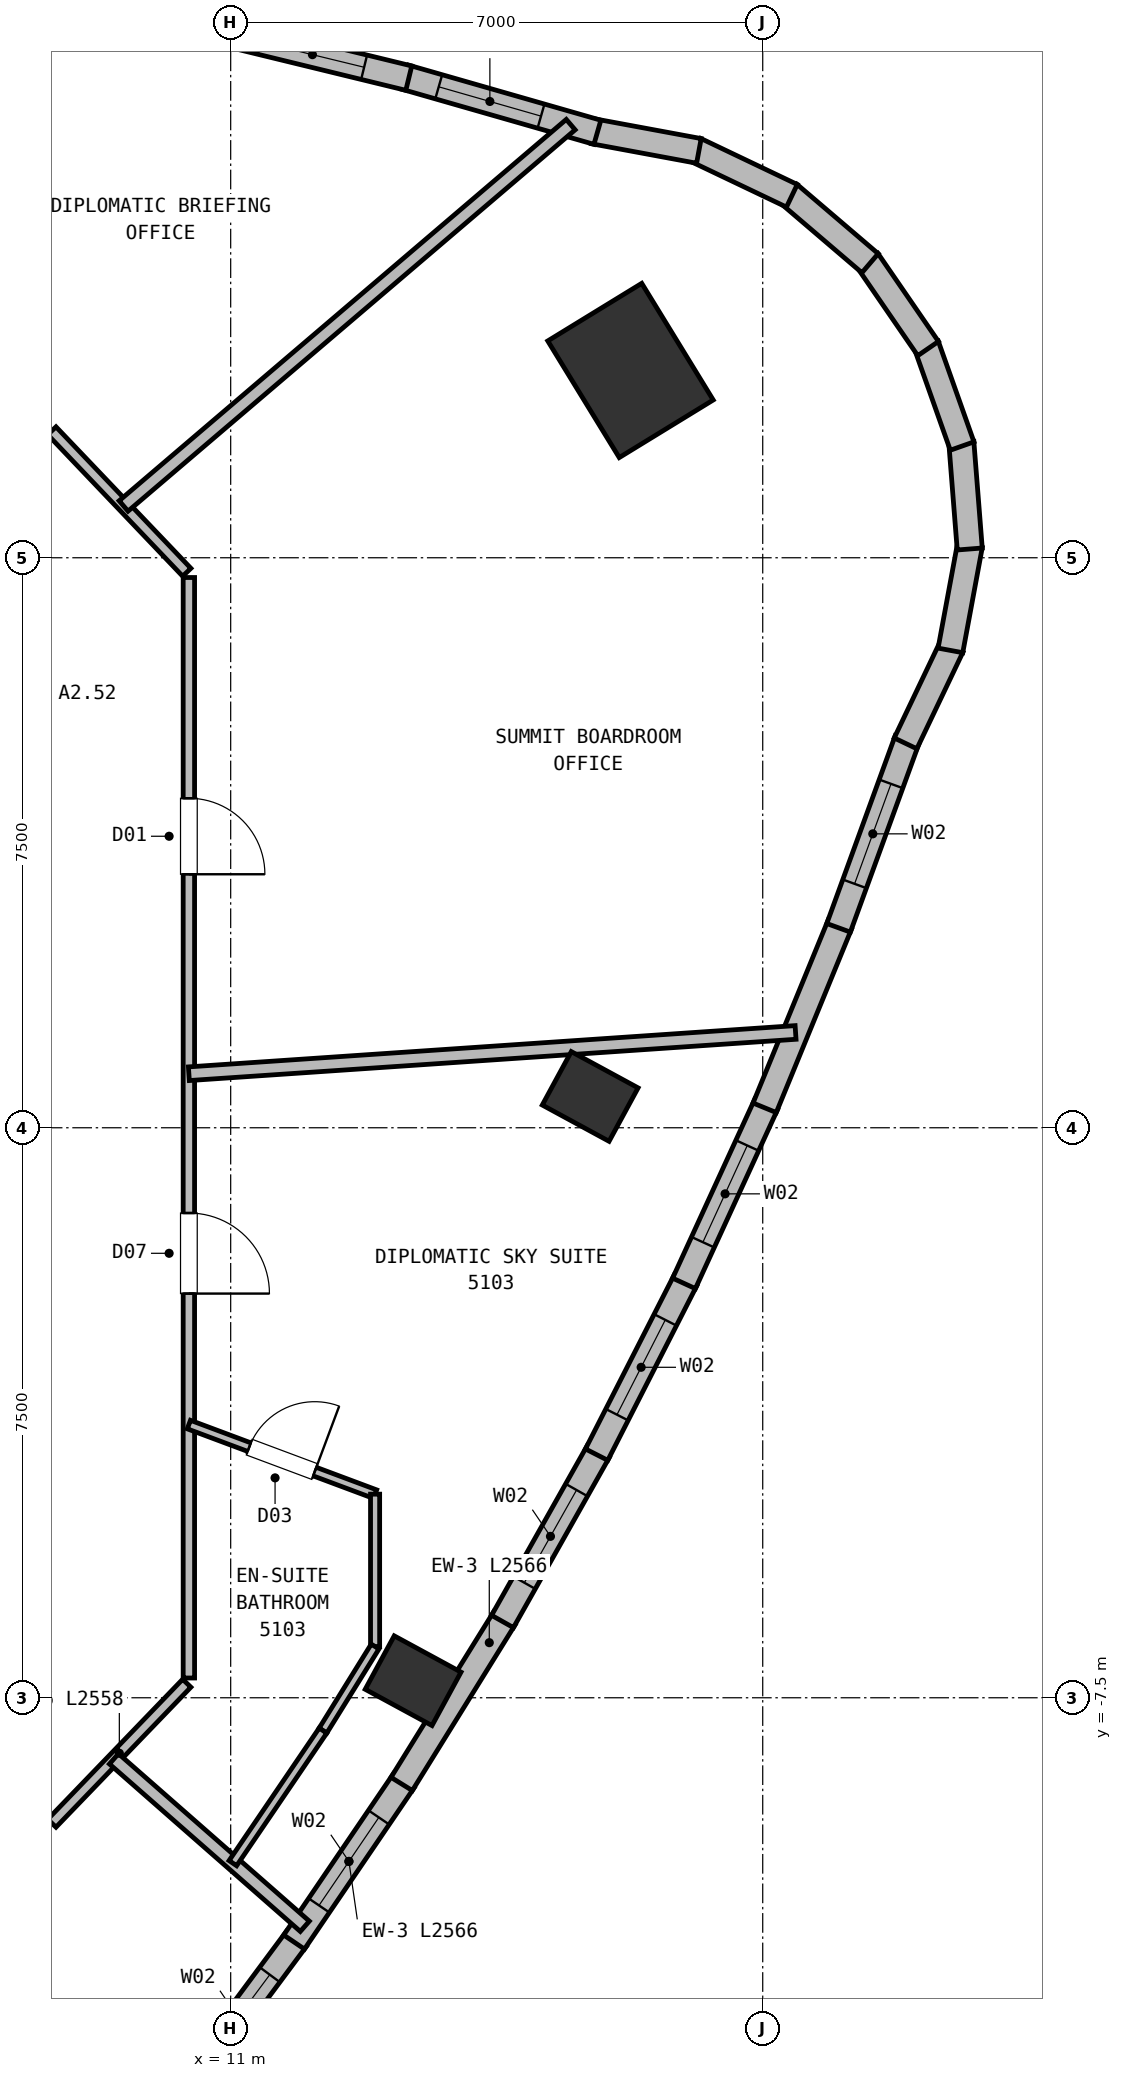
"""IFC4 building model, lengths in metres.
Left out: names, types, materials, properties, quantities, classifications, styles, units other than length and angle.
Written with IfcOpenShell. Run it as: python <this file> out.ifc"""

import sys

from ifc_helpers import new_model, si_unit, direction, frame, frame_2d, origin, origin_2d, place, context, subcontext, project, spatial, rectangle, extrude, element, fill, save


model = new_model("IFC4")
c1 = context("Model", 3, precision=1e-05, world=origin(), true_north=direction((0.0, 1.0)))
c2 = subcontext(c1, "Body", "Model", "MODEL_VIEW")
j1 = project(units=[si_unit("LENGTHUNIT", "METRE"), si_unit("PLANEANGLEUNIT", "RADIAN")], contexts=[c1])
p1 = place(None, origin())
s1 = spatial("IfcSite", under=j1, at=p1, CompositionType="ELEMENT")
p2 = place(p1, origin())
s2 = spatial("IfcBuilding", under=s1, at=p2, CompositionType="ELEMENT")
p3 = place(p2, frame((0.0, 0.0, 194.15)))
s3 = spatial("IfcBuildingStorey", under=s2, at=p3, CompositionType="ELEMENT", Elevation=194.15)
for number, where, z_axis, x_axis in (
    (1, (13.4, -7.276, 0.0), (0.0, 0.0, 1.0), (0.477, 0.879, 0.0)),
    (2, (15.73, 0.412, 0.0), (0.0, 0.0, 1.0), (0.477, 0.879, 0.0)),
):
    element("IfcColumn", number, at=place(p3, frame(where, z_axis=z_axis, x_axis=x_axis)), inside=s3, PredefinedType="COLUMN", context=c2, shape_type="SweptSolid", body=[
        extrude(rectangle(XDim=0.8, YDim=1.0, at=origin_2d()), origin(), (0.0, 0.0, 1.0), 3.8),
    ])
p4 = place(p3, frame((16.26, 9.964, 0.0), z_axis=(0.0, 0.0, 1.0), x_axis=(0.852640164354, 0.522498564716, 0.0)))
e3 = element("IfcColumn", 3, at=p4, inside=s3, PredefinedType="COLUMN", context=c2, shape_type="SweptSolid", body=[
    extrude(rectangle(XDim=1.45, YDim=1.8, at=origin_2d()), origin(), (0.0, 0.0, 1.0), 3.8),
])
p5 = place(p3, frame((11.863, -10.674, 0.0), z_axis=(0.0, 0.0, 1.0), x_axis=(-0.596178851143, -0.802851653451, 0.0)))
e4 = element("IfcWall", 4, at=p5, inside=s3, PredefinedType="SOLIDWALL", context=c2, shape_type="SweptSolid", body=[
    extrude(rectangle(XDim=2.571, YDim=0.33, at=frame_2d((1.285, 0.0))), origin(), (0.0, 0.0, 1.0), 3.55),
])
p6 = place(p5, frame((0.585, 0.0, 0.72)))
e5 = element("IfcOpeningElement", 5, at=p6, cuts=e4, PredefinedType="OPENING", context=c2, shape_type="SweptSolid", body=[
    extrude(rectangle(XDim=1.4, YDim=1.84, at=frame_2d((0.7, 0.92))), frame((0.0, 0.175, 0.0), z_axis=(0.0, -1.0, 0.0), x_axis=(1.0, 0.0, 0.0)), (0.0, 0.0, 1.0), 0.35),
])
p7 = place(p3, frame((13.277, -8.592, 0.0), z_axis=(0.0, 0.0, 1.0), x_axis=(-0.562164288669, -0.827025581554, 0.0)))
e6 = element("IfcWall", 6, at=p7, inside=s3, PredefinedType="SOLIDWALL", context=c2, shape_type="SweptSolid", body=[
    extrude(rectangle(XDim=2.566, YDim=0.33, at=frame_2d((1.283, 0.0))), origin(), (0.0, 0.0, 1.0), 3.55),
])
p8 = place(p7, frame((0.583, 0.0, 0.72)))
e7 = element("IfcOpeningElement", 7, at=p8, cuts=e6, PredefinedType="OPENING", context=c2, shape_type="SweptSolid", body=[
    extrude(rectangle(XDim=1.4, YDim=1.84, at=frame_2d((0.7, 0.92))), frame((0.0, 0.175, 0.0), z_axis=(0.0, -1.0, 0.0), x_axis=(1.0, 0.0, 0.0)), (0.0, 0.0, 1.0), 0.35),
])
p9 = place(p3, frame((14.602, -6.453, 0.0), z_axis=(0.0, 0.0, 1.0), x_axis=(-0.526908054593, -0.849922291745, 0.0)))
e8 = element("IfcWall", 8, at=p9, inside=s3, PredefinedType="SOLIDWALL", context=c2, shape_type="SweptSolid", body=[
    extrude(rectangle(XDim=2.566, YDim=0.33, at=frame_2d((1.283, 0.0))), origin(), (0.0, 0.0, 1.0), 3.55),
])
p10 = place(p3, frame((15.838, -4.257, 0.0), z_axis=(0.0, 0.0, 1.0), x_axis=(-0.490851857412, -0.871243051091, 0.0)))
e9 = element("IfcWall", 9, at=p10, inside=s3, PredefinedType="SOLIDWALL", context=c2, shape_type="SweptSolid", body=[
    extrude(rectangle(XDim=2.571, YDim=0.33, at=frame_2d((1.285, 0.0))), origin(), (0.0, 0.0, 1.0), 3.55),
])
p11 = place(p10, frame((0.585, 0.0, 0.72)))
e10 = element("IfcOpeningElement", 10, at=p11, cuts=e9, PredefinedType="OPENING", context=c2, shape_type="SweptSolid", body=[
    extrude(rectangle(XDim=1.4, YDim=1.84, at=frame_2d((0.7, 0.92))), frame((0.0, 0.175, 0.0), z_axis=(0.0, -1.0, 0.0), x_axis=(1.0, 0.0, 0.0)), (0.0, 0.0, 1.0), 0.35),
])
p12 = place(p3, frame((16.986, -2.003, 0.0), z_axis=(0.0, 0.0, 1.0), x_axis=(-0.454203650024, -0.890897886576, 0.0)))
e11 = element("IfcWall", 11, at=p12, inside=s3, PredefinedType="SOLIDWALL", context=c2, shape_type="SweptSolid", body=[
    extrude(rectangle(XDim=2.58, YDim=0.33, at=frame_2d((1.29, 0.0))), origin(), (0.0, 0.0, 1.0), 3.55),
])
p13 = place(p12, frame((0.59, 0.0, 0.72)))
e12 = element("IfcOpeningElement", 12, at=p13, cuts=e11, PredefinedType="OPENING", context=c2, shape_type="SweptSolid", body=[
    extrude(rectangle(XDim=1.4, YDim=1.84, at=frame_2d((0.7, 0.92))), frame((0.0, 0.175, 0.0), z_axis=(0.0, -1.0, 0.0), x_axis=(1.0, 0.0, 0.0)), (0.0, 0.0, 1.0), 0.35),
])
p14 = place(p3, frame((18.045, 0.309, 0.0), z_axis=(0.0, 0.0, 1.0), x_axis=(-0.41697893771, -0.908916148776, 0.0)))
e13 = element("IfcWall", 13, at=p14, inside=s3, PredefinedType="SOLIDWALL", context=c2, shape_type="SweptSolid", body=[
    extrude(rectangle(XDim=2.593, YDim=0.33, at=frame_2d((1.296, 0.0))), origin(), (0.0, 0.0, 1.0), 3.55),
])
p15 = place(p14, frame((0.596, 0.0, 0.72)))
e14 = element("IfcOpeningElement", 14, at=p15, cuts=e13, PredefinedType="OPENING", context=c2, shape_type="SweptSolid", body=[
    extrude(rectangle(XDim=1.4, YDim=1.84, at=frame_2d((0.7, 0.92))), frame((0.0, 0.175, 0.0), z_axis=(0.0, -1.0, 0.0), x_axis=(1.0, 0.0, 0.0)), (0.0, 0.0, 1.0), 0.35),
])
p16 = place(p3, frame((19.016, 2.677, 0.0), z_axis=(0.0, 0.0, 1.0), x_axis=(-0.379601522234, -0.925150087455, 0.0)))
e15 = element("IfcWall", 15, at=p16, inside=s3, PredefinedType="SOLIDWALL", context=c2, shape_type="SweptSolid", body=[
    extrude(rectangle(XDim=2.61, YDim=0.33, at=frame_2d((1.305, 0.0))), origin(), (0.0, 0.0, 1.0), 3.55),
])
p17 = place(p3, frame((19.898, 5.104, 0.0), z_axis=(0.0, 0.0, 1.0), x_axis=(-0.342100538488, -0.939663355445, 0.0)))
e16 = element("IfcWall", 16, at=p17, inside=s3, PredefinedType="SOLIDWALL", context=c2, shape_type="SweptSolid", body=[
    extrude(rectangle(XDim=2.632, YDim=0.33, at=frame_2d((1.316, 0.0))), origin(), (0.0, 0.0, 1.0), 3.55),
])
p18 = place(p17, frame((0.616, 0.0, 0.72)))
e17 = element("IfcOpeningElement", 17, at=p18, cuts=e16, PredefinedType="OPENING", context=c2, shape_type="SweptSolid", body=[
    extrude(rectangle(XDim=1.4, YDim=1.84, at=frame_2d((0.7, 0.92))), frame((0.0, 0.175, 0.0), z_axis=(0.0, -1.0, 0.0), x_axis=(1.0, 0.0, 0.0)), (0.0, 0.0, 1.0), 0.35),
])
p19 = place(p3, frame((20.485, 6.328, 0.0), z_axis=(0.0, 0.0, 1.0), x_axis=(-0.430694266873, -0.902497893894, 0.0)))
e18 = element("IfcWall", 18, at=p19, inside=s3, PredefinedType="SOLIDWALL", context=c2, shape_type="SweptSolid", body=[
    extrude(rectangle(XDim=1.407, YDim=0.33, at=frame_2d((0.704, 0.0))), origin(), (0.0, 0.0, 1.0), 3.55),
])
p20 = place(p3, frame((20.726, 7.665, 0.0), z_axis=(0.0, 0.0, 1.0), x_axis=(-0.182455673353, -0.983214080077, 0.0)))
e19 = element("IfcWall", 19, at=p20, inside=s3, PredefinedType="SOLIDWALL", context=c2, shape_type="SweptSolid", body=[
    extrude(rectangle(XDim=1.408, YDim=0.33, at=frame_2d((0.704, 0.0))), origin(), (0.0, 0.0, 1.0), 3.55),
])
p21 = place(p3, frame((20.613, 9.018, 0.0), z_axis=(0.0, 0.0, 1.0), x_axis=(0.07857999626, -0.996907811278, 0.0)))
e20 = element("IfcWall", 20, at=p21, inside=s3, PredefinedType="SOLIDWALL", context=c2, shape_type="SweptSolid", body=[
    extrude(rectangle(XDim=1.407, YDim=0.33, at=frame_2d((0.704, 0.0))), origin(), (0.0, 0.0, 1.0), 3.55),
])
p22 = place(p3, frame((20.154, 10.297, 0.0), z_axis=(0.0, 0.0, 1.0), x_axis=(0.333709077945, -0.942676111555, 0.0)))
e21 = element("IfcWall", 21, at=p22, inside=s3, PredefinedType="SOLIDWALL", context=c2, shape_type="SweptSolid", body=[
    extrude(rectangle(XDim=1.408, YDim=0.33, at=frame_2d((0.704, 0.0))), origin(), (0.0, 0.0, 1.0), 3.55),
])
for number, where, z_axis, x_axis in (
    (22, (19.379, 11.412, 0.0), (0.0, 0.0, 1.0), (0.566, -0.824, 0.0)),
    (23, (18.342, 12.29, 0.0), (0.0, 0.0, 1.0), (0.76, -0.649, 0.0)),
    (24, (17.113, 12.869, 0.0), (0.0, 0.0, 1.0), (0.903, -0.431, 0.0)),
):
    element("IfcWall", number, at=place(p3, frame(where, z_axis=z_axis, x_axis=x_axis)), inside=s3, PredefinedType="SOLIDWALL", context=c2, shape_type="SweptSolid", body=[
        extrude(rectangle(XDim=1.407, YDim=0.33, at=frame_2d((0.704, 0.0))), origin(), (0.0, 0.0, 1.0), 3.55),
    ])
p23 = place(p3, frame((15.776, 13.11, 0.0), z_axis=(0.0, 0.0, 1.0), x_axis=(0.983270499209, -0.182151380411, 0.0)))
e25 = element("IfcWall", 25, at=p23, inside=s3, PredefinedType="SOLIDWALL", context=c2, shape_type="SweptSolid", body=[
    extrude(rectangle(XDim=1.407, YDim=0.33, at=frame_2d((0.704, 0.0))), origin(), (0.0, 0.0, 1.0), 3.55),
])
p24 = place(p3, frame((13.295, 13.823, 0.0), z_axis=(0.0, 0.0, 1.0), x_axis=(0.961267980462, -0.275615438135, 0.0)))
e26 = element("IfcWall", 26, at=p24, inside=s3, PredefinedType="SOLIDWALL", context=c2, shape_type="SweptSolid", body=[
    extrude(rectangle(XDim=2.632, YDim=0.33, at=frame_2d((1.316, 0.0))), origin(), (0.0, 0.0, 1.0), 3.55),
])
p25 = place(p24, frame((0.46, 0.0, 0.72)))
e27 = element("IfcOpeningElement", 27, at=p25, cuts=e26, PredefinedType="OPENING", context=c2, shape_type="SweptSolid", body=[
    extrude(rectangle(XDim=1.4, YDim=1.84, at=frame_2d((0.7, 0.92))), frame((0.0, 0.175, 0.0), z_axis=(0.0, -1.0, 0.0), x_axis=(1.0, 0.0, 0.0)), (0.0, 0.0, 1.0), 0.35),
])
p26 = place(p3, frame((10.808, 14.428, 0.0), z_axis=(0.0, 0.0, 1.0), x_axis=(0.971593821021, -0.236654699835, 0.0)))
e28 = element("IfcWall", 28, at=p26, inside=s3, PredefinedType="SOLIDWALL", context=c2, shape_type="SweptSolid", body=[
    extrude(rectangle(XDim=2.61, YDim=0.33, at=frame_2d((1.305, 0.0))), origin(), (0.0, 0.0, 1.0), 3.55),
])
p27 = place(p26, frame((0.605, 0.0, 0.72)))
e29 = element("IfcOpeningElement", 29, at=p27, cuts=e28, PredefinedType="OPENING", context=c2, shape_type="SweptSolid", body=[
    extrude(rectangle(XDim=1.4, YDim=1.84, at=frame_2d((0.7, 0.92))), frame((0.0, 0.175, 0.0), z_axis=(0.0, -1.0, 0.0), x_axis=(1.0, 0.0, 0.0)), (0.0, 0.0, 1.0), 0.35),
])
p28 = place(p3, frame((10.422, -7.309, 0.0), z_axis=(0.0, 0.0, 1.0), x_axis=(-0.693764562202, -0.720201869085, 0.0)))
e30 = element("IfcWall", 30, at=p28, inside=s3, PredefinedType="PARTITIONING", context=c2, shape_type="SweptSolid", body=[
    extrude(rectangle(XDim=2.558, YDim=0.15, at=frame_2d((1.279, 0.0))), origin(), (0.0, 0.0, 1.0), 3.23),
])
p29 = place(p3, frame((10.45, 7.24, 0.0), z_axis=(0.0, 0.0, 1.0), x_axis=(0.0, -1.0, 0.0)))
e31 = element("IfcWall", 31, at=p29, inside=s3, PredefinedType="PARTITIONING", context=c2, shape_type="SweptSolid", body=[
    extrude(rectangle(XDim=14.48, YDim=0.15, at=frame_2d((7.24, 0.0))), origin(), (0.0, 0.0, 1.0), 3.55),
])
p30 = place(p29, frame((8.362, 0.0, 0.0)))
e32 = element("IfcOpeningElement", 32, at=p30, cuts=e31, PredefinedType="OPENING", context=c2, shape_type="SweptSolid", body=[
    extrude(rectangle(XDim=1.06, YDim=2.15, at=frame_2d((0.53, 1.075))), frame((0.0, 0.085, 0.0), z_axis=(0.0, -1.0, 0.0), x_axis=(1.0, 0.0, 0.0)), (0.0, 0.0, 1.0), 0.17),
])
p31 = place(p29, frame((2.905, 0.0, 0.0)))
e33 = element("IfcOpeningElement", 33, at=p31, cuts=e31, PredefinedType="OPENING", context=c2, shape_type="SweptSolid", body=[
    extrude(rectangle(XDim=1.0, YDim=2.15, at=frame_2d((0.5, 1.075))), frame((0.0, 0.085, 0.0), z_axis=(0.0, -1.0, 0.0), x_axis=(1.0, 0.0, 0.0)), (0.0, 0.0, 1.0), 0.17),
])
p32 = place(p3, frame((8.648, 9.171, 0.0), z_axis=(0.0, 0.0, 1.0), x_axis=(0.689960858356, -0.723846678473, 0.0)))
e34 = element("IfcWall", 34, at=p32, inside=s3, PredefinedType="PARTITIONING", context=c2, shape_type="SweptSolid", body=[
    extrude(rectangle(XDim=2.572, YDim=0.15, at=frame_2d((1.286, 0.0))), origin(), (0.0, 0.0, 1.0), 3.55),
])
p33 = place(p3, frame((9.464, -8.304, 0.0), z_axis=(0.0, 0.0, 1.0), x_axis=(0.751711445712, -0.659492154909, 0.0)))
e35 = element("IfcWall", 35, at=p33, inside=s3, PredefinedType="PARTITIONING", context=c2, shape_type="SweptSolid", body=[
    extrude(rectangle(XDim=3.341, YDim=0.18, at=frame_2d((1.67, 0.0))), origin(), (0.0, 0.0, 1.0), 3.55),
])
p34 = place(p3, frame((10.45, -3.906, 0.0), z_axis=(0.0, 0.0, 1.0), x_axis=(0.936731357681, -0.350049087325, 0.0)))
e36 = element("IfcWall", 36, at=p34, inside=s3, PredefinedType="PARTITIONING", context=c2, shape_type="SweptSolid", body=[
    extrude(rectangle(XDim=2.615, YDim=0.12, at=frame_2d((1.308, 0.0))), origin(), (0.0, 0.0, 1.0), 3.55),
])
p35 = place(p34, frame((0.848, 0.0, 0.0)))
e37 = element("IfcOpeningElement", 37, at=p35, cuts=e36, PredefinedType="OPENING", context=c2, shape_type="SweptSolid", body=[
    extrude(rectangle(XDim=0.92, YDim=2.1, at=frame_2d((0.46, 1.05))), frame((0.0, 0.07, 0.0), z_axis=(0.0, -1.0, 0.0), x_axis=(1.0, 0.0, 0.0)), (0.0, 0.0, 1.0), 0.14),
])
p36 = place(p3, frame((12.9, -4.821, 0.0), z_axis=(0.0, 0.0, 1.0), x_axis=(0.0, -1.0, 0.0)))
e38 = element("IfcWall", 38, at=p36, inside=s3, PredefinedType="PARTITIONING", context=c2, shape_type="SweptSolid", body=[
    extrude(rectangle(XDim=2.005, YDim=0.12, at=frame_2d((1.002, 0.0))), origin(), (0.0, 0.0, 1.0), 3.55),
])
p37 = place(p3, frame((12.214, -7.932, 0.0), z_axis=(0.0, 0.0, 1.0), x_axis=(0.52694237989, 0.849901010869, 0.0)))
e39 = element("IfcWall", 39, at=p37, inside=s3, PredefinedType="PARTITIONING", context=c2, shape_type="SweptSolid", body=[
    extrude(rectangle(XDim=1.301, YDim=0.12, at=frame_2d((0.65, 0.0))), origin(), (0.0, 0.0, 1.0), 3.55),
])
p38 = place(p3, frame((11.029, -9.677, 0.0), z_axis=(0.0, 0.0, 1.0), x_axis=(0.562050393964, 0.82710298914, 0.0)))
e40 = element("IfcWall", 40, at=p38, inside=s3, PredefinedType="PARTITIONING", context=c2, shape_type="SweptSolid", body=[
    extrude(rectangle(XDim=2.109, YDim=0.12, at=frame_2d((1.055, 0.0))), origin(), (0.0, 0.0, 1.0), 3.55),
])
p39 = place(p3, frame((10.45, 0.711, 0.0), z_axis=(0.0, 0.0, 1.0), x_axis=(0.997694458534, 0.067865804428, 0.0)))
e41 = element("IfcWall", 41, at=p39, inside=s3, PredefinedType="PARTITIONING", context=c2, shape_type="SweptSolid", body=[
    extrude(rectangle(XDim=8.001, YDim=0.18, at=frame_2d((4.0, 0.0))), origin(), (0.0, 0.0, 1.0), 3.55),
])
p40 = place(p3, frame((9.591, 8.181, 0.0), z_axis=(0.0, 0.0, 1.0), x_axis=(0.760812400489, 0.648971872474, 0.0)))
e42 = element("IfcWall", 42, at=p40, inside=s3, PredefinedType="PARTITIONING", context=c2, shape_type="SweptSolid", body=[
    extrude(rectangle(XDim=7.732, YDim=0.18, at=frame_2d((3.866, 0.0))), origin(), (0.0, 0.0, 1.0), 3.55),
])
p41 = place(p6, origin())
e43 = element("IfcWindow", 43, at=p41, inside=s3, PartitioningType="SINGLE_PANEL", PredefinedType="WINDOW", context=c2, shape_type="SweptSolid", body=[
    extrude(rectangle(XDim=1.4, YDim=1.84, at=frame_2d((0.7, 0.92))), frame((0.0, 0.03, 0.0), z_axis=(0.0, -1.0, 0.0), x_axis=(1.0, 0.0, 0.0)), (0.0, 0.0, 1.0), 0.06),
])
fill(e5, e43)
p42 = place(p8, origin())
e44 = element("IfcWindow", 44, at=p42, inside=s3, PartitioningType="SINGLE_PANEL", PredefinedType="WINDOW", context=c2, shape_type="SweptSolid", body=[
    extrude(rectangle(XDim=1.4, YDim=1.84, at=frame_2d((0.7, 0.92))), frame((0.0, 0.03, 0.0), z_axis=(0.0, -1.0, 0.0), x_axis=(1.0, 0.0, 0.0)), (0.0, 0.0, 1.0), 0.06),
])
fill(e7, e44)
p43 = place(p11, origin())
e45 = element("IfcWindow", 45, at=p43, inside=s3, PartitioningType="SINGLE_PANEL", PredefinedType="WINDOW", context=c2, shape_type="SweptSolid", body=[
    extrude(rectangle(XDim=1.4, YDim=1.84, at=frame_2d((0.7, 0.92))), frame((0.0, 0.03, 0.0), z_axis=(0.0, -1.0, 0.0), x_axis=(1.0, 0.0, 0.0)), (0.0, 0.0, 1.0), 0.06),
])
fill(e10, e45)
p44 = place(p13, origin())
e46 = element("IfcWindow", 46, at=p44, inside=s3, PartitioningType="SINGLE_PANEL", PredefinedType="WINDOW", context=c2, shape_type="SweptSolid", body=[
    extrude(rectangle(XDim=1.4, YDim=1.84, at=frame_2d((0.7, 0.92))), frame((0.0, 0.03, 0.0), z_axis=(0.0, -1.0, 0.0), x_axis=(1.0, 0.0, 0.0)), (0.0, 0.0, 1.0), 0.06),
])
fill(e12, e46)
p45 = place(p15, origin())
e47 = element("IfcWindow", 47, at=p45, inside=s3, PartitioningType="SINGLE_PANEL", PredefinedType="WINDOW", context=c2, shape_type="SweptSolid", body=[
    extrude(rectangle(XDim=1.4, YDim=1.84, at=frame_2d((0.7, 0.92))), frame((0.0, 0.03, 0.0), z_axis=(0.0, -1.0, 0.0), x_axis=(1.0, 0.0, 0.0)), (0.0, 0.0, 1.0), 0.06),
])
fill(e14, e47)
p46 = place(p18, origin())
e48 = element("IfcWindow", 48, at=p46, inside=s3, PartitioningType="SINGLE_PANEL", PredefinedType="WINDOW", context=c2, shape_type="SweptSolid", body=[
    extrude(rectangle(XDim=1.4, YDim=1.84, at=frame_2d((0.7, 0.92))), frame((0.0, 0.03, 0.0), z_axis=(0.0, -1.0, 0.0), x_axis=(1.0, 0.0, 0.0)), (0.0, 0.0, 1.0), 0.06),
])
fill(e17, e48)
p47 = place(p25, origin())
e49 = element("IfcWindow", 49, at=p47, inside=s3, PartitioningType="SINGLE_PANEL", PredefinedType="WINDOW", context=c2, shape_type="SweptSolid", body=[
    extrude(rectangle(XDim=1.4, YDim=1.84, at=frame_2d((0.7, 0.92))), frame((0.0, 0.03, 0.0), z_axis=(0.0, -1.0, 0.0), x_axis=(1.0, 0.0, 0.0)), (0.0, 0.0, 1.0), 0.06),
])
fill(e27, e49)
p48 = place(p27, origin())
e50 = element("IfcWindow", 50, at=p48, inside=s3, PartitioningType="SINGLE_PANEL", PredefinedType="WINDOW", context=c2, shape_type="SweptSolid", body=[
    extrude(rectangle(XDim=1.4, YDim=1.84, at=frame_2d((0.7, 0.92))), frame((0.0, 0.03, 0.0), z_axis=(0.0, -1.0, 0.0), x_axis=(1.0, 0.0, 0.0)), (0.0, 0.0, 1.0), 0.06),
])
fill(e29, e50)
p49 = place(p35, origin())
e51 = element("IfcDoor", 51, at=p49, inside=s3, OperationType="SINGLE_SWING_RIGHT", PredefinedType="DOOR", context=c2, shape_type="SweptSolid", body=[
    extrude(rectangle(XDim=0.92, YDim=2.1, at=frame_2d((0.46, 1.05))), frame((0.0, 0.025, 0.0), z_axis=(0.0, -1.0, 0.0), x_axis=(1.0, 0.0, 0.0)), (0.0, 0.0, 1.0), 0.05),
])
fill(e37, e51)
p50 = place(p30, origin())
e52 = element("IfcDoor", 52, at=p50, inside=s3, OperationType="SINGLE_SWING_RIGHT", PredefinedType="DOOR", context=c2, shape_type="SweptSolid", body=[
    extrude(rectangle(XDim=1.06, YDim=2.15, at=frame_2d((0.53, 1.075))), frame((0.0, 0.025, 0.0), z_axis=(0.0, -1.0, 0.0), x_axis=(1.0, 0.0, 0.0)), (0.0, 0.0, 1.0), 0.05),
])
fill(e32, e52)
p51 = place(p31, origin())
e53 = element("IfcDoor", 53, at=p51, inside=s3, OperationType="SINGLE_SWING_RIGHT", PredefinedType="DOOR", context=c2, shape_type="SweptSolid", body=[
    extrude(rectangle(XDim=1.0, YDim=2.15, at=frame_2d((0.5, 1.075))), frame((0.0, 0.025, 0.0), z_axis=(0.0, -1.0, 0.0), x_axis=(1.0, 0.0, 0.0)), (0.0, 0.0, 1.0), 0.05),
])
fill(e33, e53)
save(model, sys.argv[1])
